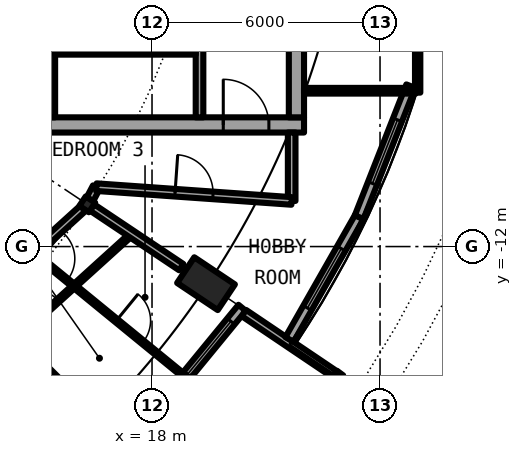
"""IFC4 building model, lengths in metres.
Left out: names, types, materials, properties, quantities, classifications, styles, units other than length and angle.
Written with IfcOpenShell. Run it as: python <this file> out.ifc"""

import sys

from ifc_helpers import new_model, si_unit, direction, frame, frame_2d, origin, origin_2d, place, context, subcontext, project, spatial, rectangle, circle, hollow_circle, i_section, extrude, element, fill, save


model = new_model("IFC4")
c1 = context("Model", 3, precision=1e-05, world=origin(), true_north=direction((0.0, 1.0)))
c2 = subcontext(c1, "Body", "Model", "MODEL_VIEW")
j1 = project(units=[si_unit("LENGTHUNIT", "METRE"), si_unit("PLANEANGLEUNIT", "RADIAN")], contexts=[c1])
p1 = place(None, origin())
s1 = spatial("IfcSite", under=j1, at=p1, CompositionType="ELEMENT")
p2 = place(p1, origin())
s2 = spatial("IfcBuilding", under=s1, at=p2, CompositionType="ELEMENT")
p3 = place(p2, frame((0.0, 0.0, 246.25)))
s3 = spatial("IfcBuildingStorey", under=s2, at=p3, CompositionType="ELEMENT", Elevation=246.25)
p4 = place(p3, frame((19.955, -13.334, 0.0), z_axis=(-0.346819263352, 0.231767499499, 0.908845545043), x_axis=(-0.555620411262, -0.831436082083, 0.0)))
e1 = element("IfcColumn", 1, at=p4, inside=s3, PredefinedType="COLUMN", context=c2, shape_type="SweptSolid", body=[
    extrude(hollow_circle(Radius=0.406, WallThickness=0.03, at=origin_2d()), origin(), (0.0, 0.0, 1.0), 3.081),
])
p5 = place(p3, frame((16.297, -10.889, 0.0), z_axis=(0.0, 0.0, 1.0), x_axis=(0.831469612303, -0.55557023302, 0.0)))
e2 = element("IfcColumn", 2, at=p5, inside=s3, PredefinedType="COLUMN", context=c2, shape_type="SweptSolid", body=[
    extrude(i_section(OverallWidth=0.3, OverallDepth=0.3, WebThickness=0.011, FlangeThickness=0.019, FilletRadius=0.027, at=origin_2d()), origin(), (0.0, 0.0, 1.0), 3.05),
])
p6 = place(p3, frame((17.324, -17.324, 0.0), z_axis=(0.0, 0.0, 1.0), x_axis=(0.634396836208, 0.773007538262, 0.0)))
e3 = element("IfcWall", 3, at=p6, inside=s3, PredefinedType="SOLIDWALL", context=c2, shape_type="SweptSolid", body=[
    extrude(rectangle(XDim=4.803, YDim=0.25, at=frame_2d((2.402, 0.0))), origin(), (0.0, 0.0, 1.0), 2.7),
])
p7 = place(p6, frame((0.704, 0.0, 0.0)))
e4 = element("IfcOpeningElement", 4, at=p7, cuts=e3, PredefinedType="OPENING", context=c2, shape_type="SweptSolid", body=[
    extrude(rectangle(XDim=1.0, YDim=2.2, at=frame_2d((0.5, 1.1))), frame((0.0, 0.135, 0.0), z_axis=(0.0, -1.0, 0.0), x_axis=(1.0, 0.0, 0.0)), (0.0, 0.0, 1.0), 0.27),
])
p8 = place(p6, frame((2.542, 0.0, 0.3)))
e5 = element("IfcOpeningElement", 5, at=p8, cuts=e3, PredefinedType="OPENING", context=c2, shape_type="SweptSolid", body=[
    extrude(rectangle(XDim=1.8, YDim=2.1, at=frame_2d((0.9, 1.05))), frame((0.0, 0.135, 0.0), z_axis=(0.0, -1.0, 0.0), x_axis=(1.0, 0.0, 0.0)), (0.0, 0.0, 1.0), 0.27),
])
p9 = place(p3, frame((21.332, -17.513, -0.03), z_axis=(0.0, 0.0, 1.0), x_axis=(0.59569365177, 0.803211723794, 0.0)))
e6 = element("IfcWall", 6, at=p9, inside=s3, PredefinedType="SOLIDWALL", context=c2, shape_type="SweptSolid", body=[
    extrude(rectangle(XDim=2.718, YDim=0.2, at=frame_2d((1.359, 0.0))), origin(), (0.0, 0.0, 1.0), 2.73),
])
p10 = place(p9, frame((0.319, 0.0, 0.33)))
e7 = element("IfcOpeningElement", 7, at=p10, cuts=e6, PredefinedType="OPENING", context=c2, shape_type="SweptSolid", body=[
    extrude(circle(Radius=1.04, at=frame_2d((1.04, 1.04))), frame((0.0, 0.11, 0.0), z_axis=(0.0, -1.0, 0.0), x_axis=(1.0, 0.0, 0.0)), (0.0, 0.0, 1.0), 0.22),
])
p11 = place(p3, frame((20.419, -13.75, -0.03), z_axis=(0.0, 0.0, 1.0), x_axis=(0.829211810515, -0.558934498222, 0.0)))
e8 = element("IfcWall", 8, at=p11, inside=s3, PredefinedType="SOLIDWALL", context=c2, shape_type="SweptSolid", body=[
    extrude(rectangle(XDim=2.882, YDim=0.2, at=frame_2d((1.441, 0.0))), origin(), (0.0, 0.0, 1.0), 2.73),
])
p12 = place(p3, frame((21.618, -14.445, 0.0), z_axis=(0.0, 0.0, 1.0), x_axis=(0.495031435966, 0.868875064325, 0.0)))
e9 = element("IfcWall", 9, at=p12, inside=s3, PredefinedType="SOLIDWALL", context=c2, shape_type="SweptSolid", body=[
    extrude(rectangle(XDim=3.705, YDim=0.25, at=frame_2d((1.853, 0.0))), origin(), (0.0, 0.0, 1.0), 2.7),
])
p13 = place(p12, frame((0.952, 0.0, 0.3)))
e10 = element("IfcOpeningElement", 10, at=p13, cuts=e9, PredefinedType="OPENING", context=c2, shape_type="SweptSolid", body=[
    extrude(rectangle(XDim=1.8, YDim=2.1, at=frame_2d((0.9, 1.05))), frame((0.0, 0.135, 0.0), z_axis=(0.0, -1.0, 0.0), x_axis=(1.0, 0.0, 0.0)), (0.0, 0.0, 1.0), 0.27),
])
p14 = place(p3, frame((23.452, -11.226, 0.0), z_axis=(0.0, 0.0, 1.0), x_axis=(0.366351636034, 0.930476479432, 0.0)))
e11 = element("IfcWall", 11, at=p14, inside=s3, PredefinedType="SOLIDWALL", context=c2, shape_type="SweptSolid", body=[
    extrude(rectangle(XDim=3.705, YDim=0.25, at=frame_2d((1.852, 0.0))), origin(), (0.0, 0.0, 1.0), 2.7),
])
p15 = place(p14, frame((0.952, 0.0, 0.3)))
e12 = element("IfcOpeningElement", 12, at=p15, cuts=e11, PredefinedType="OPENING", context=c2, shape_type="SweptSolid", body=[
    extrude(rectangle(XDim=1.8, YDim=2.1, at=frame_2d((0.9, 1.05))), frame((0.0, 0.135, 0.0), z_axis=(0.0, -1.0, 0.0), x_axis=(1.0, 0.0, 0.0)), (0.0, 0.0, 1.0), 0.27),
])
p16 = place(p3, frame((8.6, -8.8, 0.0), z_axis=(0.0, 0.0, 1.0), x_axis=(1.0, 0.0, 0.0)))
e13 = element("IfcWall", 13, at=p16, inside=s3, PredefinedType="SHEAR", context=c2, shape_type="SweptSolid", body=[
    extrude(rectangle(XDim=13.4, YDim=0.4, at=frame_2d((6.7, 0.0))), origin(), (0.0, 0.0, 1.0), 3.05),
])
p17 = place(p16, frame((11.275, 0.0, 0.0)))
e14 = element("IfcOpeningElement", 14, at=p17, cuts=e13, PredefinedType="OPENING", context=c2, shape_type="SweptSolid", body=[
    extrude(rectangle(XDim=1.2, YDim=2.3, at=frame_2d((0.6, 1.15))), frame((0.0, 0.21, 0.0), z_axis=(0.0, -1.0, 0.0), x_axis=(1.0, 0.0, 0.0)), (0.0, 0.0, 1.0), 0.42),
])
p18 = place(p3, frame((21.8, 8.6, 0.0), z_axis=(0.0, 0.0, 1.0), x_axis=(0.0, -1.0, 0.0)))
e15 = element("IfcWall", 15, at=p18, inside=s3, PredefinedType="SHEAR", context=c2, shape_type="SweptSolid", body=[
    extrude(rectangle(XDim=17.2, YDim=0.4, at=frame_2d((8.6, 0.0))), origin(), (0.0, 0.0, 1.0), 3.05),
])
p19 = place(p18, frame((7.7, 0.0, 0.0)))
e16 = element("IfcOpeningElement", 16, at=p19, cuts=e15, PredefinedType="OPENING", context=c2, shape_type="SweptSolid", body=[
    extrude(rectangle(XDim=1.8, YDim=2.3, at=frame_2d((0.9, 1.15))), frame((0.0, 0.21, 0.0), z_axis=(0.0, -1.0, 0.0), x_axis=(1.0, 0.0, 0.0)), (0.0, 0.0, 1.0), 0.42),
])
p20 = place(p3, frame((15.325, -8.6, 0.0), z_axis=(0.0, 0.0, 1.0), x_axis=(0.0, 1.0, 0.0)))
e17 = element("IfcWall", 17, at=p20, inside=s3, PredefinedType="SHEAR", context=c2, shape_type="SweptSolid", body=[
    extrude(rectangle(XDim=3.95, YDim=0.25, at=frame_2d((1.975, 0.0))), origin(), (0.0, 0.0, 1.0), 3.05),
])
p21 = place(p20, frame((2.025, 0.0, 0.0)))
e18 = element("IfcOpeningElement", 18, at=p21, cuts=e17, PredefinedType="OPENING", context=c2, shape_type="SweptSolid", body=[
    extrude(rectangle(XDim=1.2, YDim=2.3, at=frame_2d((0.6, 1.15))), frame((0.0, 0.135, 0.0), z_axis=(0.0, -1.0, 0.0), x_axis=(1.0, 0.0, 0.0)), (0.0, 0.0, 1.0), 0.27),
])
p22 = place(p3, frame((19.25, -8.6, 0.0), z_axis=(0.0, 0.0, 1.0), x_axis=(0.0, 1.0, 0.0)))
e19 = element("IfcWall", 19, at=p22, inside=s3, PredefinedType="SOLIDWALL", context=c2, shape_type="SweptSolid", body=[
    extrude(rectangle(XDim=7.025, YDim=0.2, at=frame_2d((3.513, 0.0))), origin(), (0.0, 0.0, 1.0), 2.7),
])
p23 = place(p22, frame((2.35, 0.0, 0.0)))
e20 = element("IfcOpeningElement", 20, at=p23, cuts=e19, PredefinedType="OPENING", context=c2, shape_type="SweptSolid", body=[
    extrude(rectangle(XDim=1.1, YDim=2.3, at=frame_2d((0.55, 1.15))), frame((0.0, 0.11, 0.0), z_axis=(0.0, -1.0, 0.0), x_axis=(1.0, 0.0, 0.0)), (0.0, 0.0, 1.0), 0.22),
])
p24 = place(p3, frame((15.45, -6.875, 0.0), z_axis=(0.0, 0.0, 1.0), x_axis=(1.0, 0.0, 0.0)))
e21 = element("IfcWall", 21, at=p24, inside=s3, PredefinedType="PARTITIONING", context=c2, shape_type="SweptSolid", body=[
    extrude(rectangle(XDim=3.7, YDim=0.15, at=frame_2d((1.85, 0.0))), origin(), (0.0, 0.0, 1.0), 2.7),
])
p25 = place(p24, frame((1.4, 0.0, 0.0)))
e22 = element("IfcOpeningElement", 22, at=p25, cuts=e21, PredefinedType="OPENING", context=c2, shape_type="SweptSolid", body=[
    extrude(rectangle(XDim=0.9, YDim=2.3, at=frame_2d((0.45, 1.15))), frame((0.0, 0.085, 0.0), z_axis=(0.0, -1.0, 0.0), x_axis=(1.0, 0.0, 0.0)), (0.0, 0.0, 1.0), 0.17),
])
p26 = place(p3, frame((22.0, -7.9, 0.0), z_axis=(0.0, 0.0, 1.0), x_axis=(1.0, 0.0, 0.0)))
e23 = element("IfcWall", 23, at=p26, inside=s3, PredefinedType="PARTITIONING", context=c2, shape_type="SweptSolid", body=[
    extrude(rectangle(XDim=2.94, YDim=0.15, at=frame_2d((1.47, 0.0))), origin(), (0.0, 0.0, 1.0), 2.7),
])
p27 = place(p3, frame((25.0, -7.95, 0.0), z_axis=(0.0, 0.0, 1.0), x_axis=(0.0, 1.0, 0.0)))
e24 = element("IfcWall", 24, at=p27, inside=s3, PredefinedType="PARTITIONING", context=c2, shape_type="SweptSolid", body=[
    extrude(rectangle(XDim=15.9, YDim=0.12, at=frame_2d((7.95, 0.0))), origin(), (0.0, 0.0, 1.0), 2.7),
])
p28 = place(p27, frame((0.95, 0.0, 0.1)))
e25 = element("IfcOpeningElement", 25, at=p28, cuts=e24, PredefinedType="OPENING", context=c2, shape_type="SweptSolid", body=[
    extrude(rectangle(XDim=14.0, YDim=2.35, at=frame_2d((7.0, 1.175))), frame((0.0, 0.07, 0.0), z_axis=(0.0, -1.0, 0.0), x_axis=(1.0, 0.0, 0.0)), (0.0, 0.0, 1.0), 0.14),
])
p29 = place(p3, frame((21.675, -10.8, 0.0), z_axis=(0.0, 0.0, 1.0), x_axis=(0.0, 1.0, 0.0)))
e26 = element("IfcWall", 26, at=p29, inside=s3, PredefinedType="PARTITIONING", context=c2, shape_type="SweptSolid", body=[
    extrude(rectangle(XDim=1.8, YDim=0.2, at=frame_2d((0.9, 0.0))), origin(), (0.0, 0.0, 1.0), 2.7),
])
p30 = place(p3, frame((12.92, -15.785, 0.0), z_axis=(0.0, 0.0, 1.0), x_axis=(0.74123210671, 0.671248809297, 0.0)))
e27 = element("IfcWall", 27, at=p30, inside=s3, PredefinedType="PARTITIONING", context=c2, shape_type="SweptSolid", body=[
    extrude(rectangle(XDim=6.115, YDim=0.1, at=frame_2d((3.058, 0.0))), origin(), (0.0, 0.0, 1.0), 2.7),
])
p31 = place(p30, frame((2.622, 0.0, 0.0)))
e28 = element("IfcOpeningElement", 28, at=p31, cuts=e27, PredefinedType="OPENING", context=c2, shape_type="SweptSolid", body=[
    extrude(rectangle(XDim=0.9, YDim=2.3, at=frame_2d((0.45, 1.15))), frame((0.0, 0.06, 0.0), z_axis=(0.0, -1.0, 0.0), x_axis=(1.0, 0.0, 0.0)), (0.0, 0.0, 1.0), 0.12),
])
p32 = place(p3, frame((16.367, -10.756, 0.0), z_axis=(0.0, 0.0, 1.0), x_axis=(0.465802239822, 0.884888848035, 0.0)))
e29 = element("IfcWall", 29, at=p32, inside=s3, PredefinedType="PARTITIONING", context=c2, shape_type="SweptSolid", body=[
    extrude(rectangle(XDim=0.361, YDim=0.2, at=frame_2d((0.18, 0.0))), origin(), (0.0, 0.0, 1.0), 2.7),
])
p33 = place(p3, frame((9.239, -17.286, 0.0), z_axis=(0.0, 0.0, 1.0), x_axis=(0.740934281602, 0.671577538596, 0.0)))
e30 = element("IfcWall", 30, at=p33, inside=s3, PredefinedType="PARTITIONING", context=c2, shape_type="SweptSolid", body=[
    extrude(rectangle(XDim=9.37, YDim=0.2, at=frame_2d((4.685, 0.0))), origin(), (0.0, 0.0, 1.0), 2.45),
])
p34 = place(p33, frame((4.263, 0.0, 0.0)))
e31 = element("IfcOpeningElement", 31, at=p34, cuts=e30, PredefinedType="OPENING", context=c2, shape_type="SweptSolid", body=[
    extrude(rectangle(XDim=1.0, YDim=2.3, at=frame_2d((0.5, 1.15))), frame((0.0, 0.11, 0.0), z_axis=(0.0, -1.0, 0.0), x_axis=(1.0, 0.0, 0.0)), (0.0, 0.0, 1.0), 0.22),
])
p35 = place(p3, frame((16.535, -10.437, 0.0), z_axis=(0.0, 0.0, 1.0), x_axis=(0.997515141784, -0.070452408845, 0.0)))
e32 = element("IfcWall", 32, at=p35, inside=s3, PredefinedType="PARTITIONING", context=c2, shape_type="SweptSolid", body=[
    extrude(rectangle(XDim=5.153, YDim=0.2, at=frame_2d((2.576, 0.0))), origin(), (0.0, 0.0, 1.0), 2.7),
])
p36 = place(p35, frame((2.076, 0.0, 0.0)))
e33 = element("IfcOpeningElement", 33, at=p36, cuts=e32, PredefinedType="OPENING", context=c2, shape_type="SweptSolid", body=[
    extrude(rectangle(XDim=1.0, YDim=2.3, at=frame_2d((0.5, 1.15))), frame((0.0, 0.11, 0.0), z_axis=(0.0, -1.0, 0.0), x_axis=(1.0, 0.0, 0.0)), (0.0, 0.0, 1.0), 0.22),
])
p37 = place(p3, frame((14.436, -14.408, 0.0), z_axis=(0.0, 0.0, 1.0), x_axis=(0.707720109647, -0.706492920277, 0.0)))
e34 = element("IfcWall", 34, at=p37, inside=s3, PredefinedType="PARTITIONING", context=c2, shape_type="SweptSolid", body=[
    extrude(rectangle(XDim=3.979, YDim=0.1, at=frame_2d((1.989, 0.0))), origin(), (0.0, 0.0, 1.0), 2.7),
])
p38 = place(p3, frame((14.885, -12.168, 0.0), z_axis=(0.0, 0.0, 1.0), x_axis=(0.774252940636, -0.632876278522, 0.0)))
e35 = element("IfcWall", 35, at=p38, inside=s3, PredefinedType="PARTITIONING", context=c2, shape_type="SweptSolid", body=[
    extrude(rectangle(XDim=5.15, YDim=0.1, at=frame_2d((2.575, 0.0))), origin(), (0.0, 0.0, 1.0), 2.7),
])
p39 = place(p38, frame((0.237, 0.0, 0.0)))
e36 = element("IfcOpeningElement", 36, at=p39, cuts=e35, PredefinedType="OPENING", context=c2, shape_type="SweptSolid", body=[
    extrude(rectangle(XDim=0.9, YDim=2.3, at=frame_2d((0.45, 1.15))), frame((0.0, 0.06, 0.0), z_axis=(0.0, -1.0, 0.0), x_axis=(1.0, 0.0, 0.0)), (0.0, 0.0, 1.0), 0.12),
])
p40 = place(p38, frame((2.812, 0.0, 0.0)))
e37 = element("IfcOpeningElement", 37, at=p40, cuts=e35, PredefinedType="OPENING", context=c2, shape_type="SweptSolid", body=[
    extrude(rectangle(XDim=0.9, YDim=2.3, at=frame_2d((0.45, 1.15))), frame((0.0, 0.06, 0.0), z_axis=(0.0, -1.0, 0.0), x_axis=(1.0, 0.0, 0.0)), (0.0, 0.0, 1.0), 0.12),
])
p41 = place(p3, frame((16.422, -10.972, 0.0), z_axis=(0.0, 0.0, 1.0), x_axis=(0.83131782921, -0.555797325324, 0.0)))
e38 = element("IfcWall", 38, at=p41, inside=s3, PredefinedType="PARTITIONING", context=c2, shape_type="SweptSolid", body=[
    extrude(rectangle(XDim=2.823, YDim=0.2, at=frame_2d((1.412, 0.0))), origin(), (0.0, 0.0, 1.0), 2.7),
])
p42 = place(p8, origin())
e39 = element("IfcWindow", 39, at=p42, inside=s3, PartitioningType="SINGLE_PANEL", PredefinedType="WINDOW", context=c2, shape_type="SweptSolid", body=[
    extrude(rectangle(XDim=1.8, YDim=2.1, at=frame_2d((0.9, 1.05))), frame((0.0, 0.03, 0.0), z_axis=(0.0, -1.0, 0.0), x_axis=(1.0, 0.0, 0.0)), (0.0, 0.0, 1.0), 0.06),
])
fill(e5, e39)
p43 = place(p13, origin())
e40 = element("IfcWindow", 40, at=p43, inside=s3, PartitioningType="SINGLE_PANEL", PredefinedType="WINDOW", context=c2, shape_type="SweptSolid", body=[
    extrude(rectangle(XDim=1.8, YDim=2.1, at=frame_2d((0.9, 1.05))), frame((0.0, 0.03, 0.0), z_axis=(0.0, -1.0, 0.0), x_axis=(1.0, 0.0, 0.0)), (0.0, 0.0, 1.0), 0.06),
])
fill(e10, e40)
p44 = place(p15, origin())
e41 = element("IfcWindow", 41, at=p44, inside=s3, PartitioningType="SINGLE_PANEL", PredefinedType="WINDOW", context=c2, shape_type="SweptSolid", body=[
    extrude(rectangle(XDim=1.8, YDim=2.1, at=frame_2d((0.9, 1.05))), frame((0.0, 0.03, 0.0), z_axis=(0.0, -1.0, 0.0), x_axis=(1.0, 0.0, 0.0)), (0.0, 0.0, 1.0), 0.06),
])
fill(e12, e41)
p45 = place(p25, origin())
e42 = element("IfcDoor", 42, at=p45, inside=s3, OperationType="SINGLE_SWING_LEFT", PredefinedType="DOOR", context=c2, shape_type="SweptSolid", body=[
    extrude(rectangle(XDim=0.9, YDim=2.3, at=frame_2d((0.45, 1.15))), frame((0.0, 0.025, 0.0), z_axis=(0.0, -1.0, 0.0), x_axis=(1.0, 0.0, 0.0)), (0.0, 0.0, 1.0), 0.05),
])
fill(e22, e42)
p46 = place(p17, origin())
e43 = element("IfcDoor", 43, at=p46, inside=s3, OperationType="SINGLE_SWING_LEFT", PredefinedType="DOOR", context=c2, shape_type="SweptSolid", body=[
    extrude(rectangle(XDim=1.2, YDim=2.3, at=frame_2d((0.6, 1.15))), frame((0.0, 0.025, 0.0), z_axis=(0.0, -1.0, 0.0), x_axis=(1.0, 0.0, 0.0)), (0.0, 0.0, 1.0), 0.05),
])
fill(e14, e43)
p47 = place(p28, origin())
e44 = element("IfcWindow", 44, at=p47, inside=s3, PartitioningType="SINGLE_PANEL", PredefinedType="WINDOW", context=c2, shape_type="SweptSolid", body=[
    extrude(rectangle(XDim=14.0, YDim=2.35, at=frame_2d((7.0, 1.175))), frame((0.0, 0.03, 0.0), z_axis=(0.0, -1.0, 0.0), x_axis=(1.0, 0.0, 0.0)), (0.0, 0.0, 1.0), 0.06),
])
fill(e25, e44)
p48 = place(p39, origin())
e45 = element("IfcDoor", 45, at=p48, inside=s3, OperationType="SINGLE_SWING_LEFT", PredefinedType="DOOR", context=c2, shape_type="SweptSolid", body=[
    extrude(rectangle(XDim=0.9, YDim=2.3, at=frame_2d((0.45, 1.15))), frame((0.0, 0.025, 0.0), z_axis=(0.0, -1.0, 0.0), x_axis=(1.0, 0.0, 0.0)), (0.0, 0.0, 1.0), 0.05),
])
fill(e36, e45)
p49 = place(p31, origin())
e46 = element("IfcDoor", 46, at=p49, inside=s3, OperationType="SINGLE_SWING_RIGHT", PredefinedType="DOOR", context=c2, shape_type="SweptSolid", body=[
    extrude(rectangle(XDim=0.9, YDim=2.3, at=frame_2d((0.45, 1.15))), frame((0.0, 0.025, 0.0), z_axis=(0.0, -1.0, 0.0), x_axis=(1.0, 0.0, 0.0)), (0.0, 0.0, 1.0), 0.05),
])
fill(e28, e46)
p50 = place(p40, origin())
e47 = element("IfcDoor", 47, at=p50, inside=s3, OperationType="SINGLE_SWING_RIGHT", PredefinedType="DOOR", context=c2, shape_type="SweptSolid", body=[
    extrude(rectangle(XDim=0.9, YDim=2.3, at=frame_2d((0.45, 1.15))), frame((0.0, 0.025, 0.0), z_axis=(0.0, -1.0, 0.0), x_axis=(1.0, 0.0, 0.0)), (0.0, 0.0, 1.0), 0.05),
])
fill(e37, e47)
p51 = place(p36, origin())
e48 = element("IfcDoor", 48, at=p51, inside=s3, OperationType="SINGLE_SWING_LEFT", PredefinedType="DOOR", context=c2, shape_type="SweptSolid", body=[
    extrude(rectangle(XDim=1.0, YDim=2.3, at=frame_2d((0.5, 1.15))), frame((0.0, 0.025, 0.0), z_axis=(0.0, -1.0, 0.0), x_axis=(1.0, 0.0, 0.0)), (0.0, 0.0, 1.0), 0.05),
])
fill(e33, e48)
save(model, sys.argv[1])
